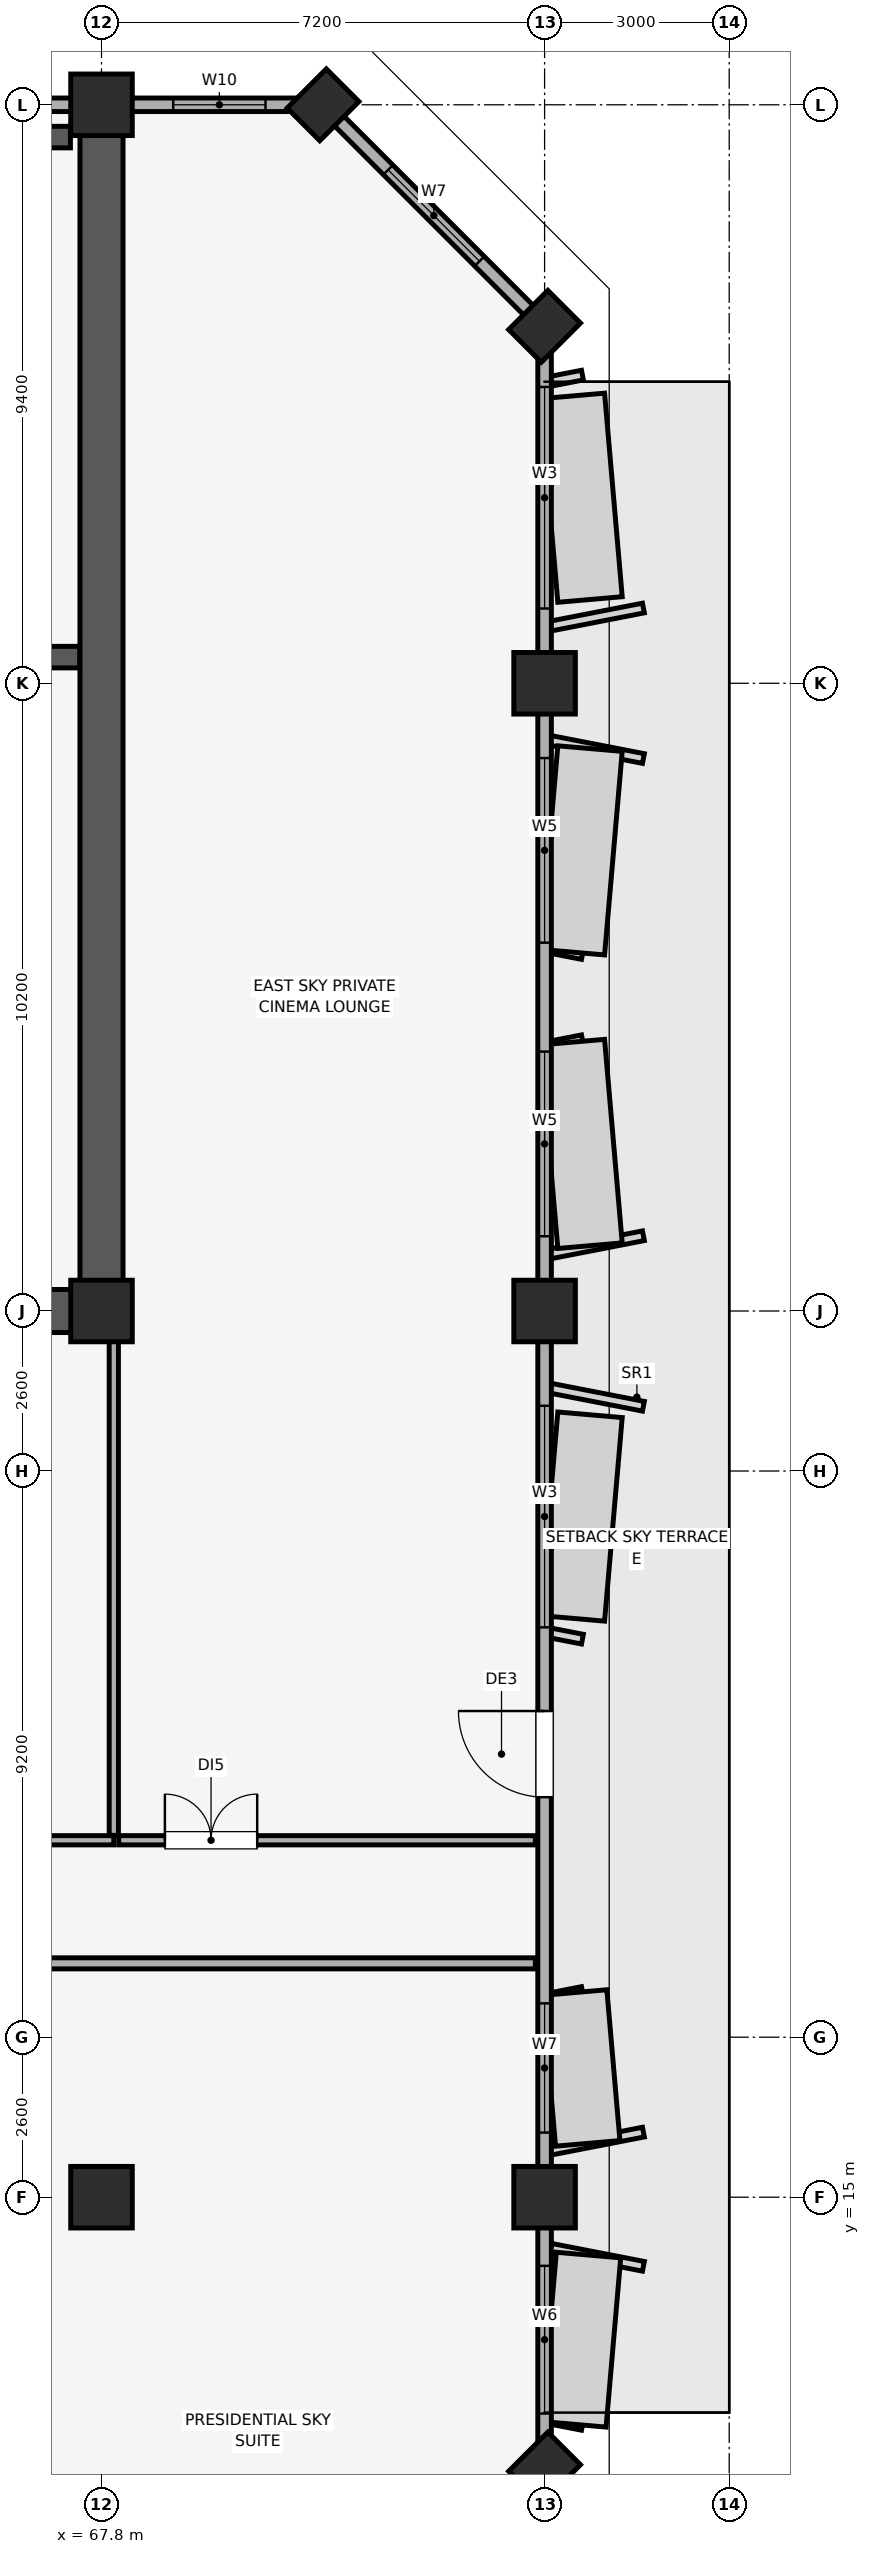
"""IFC4 building model, lengths in metres.
Left out: names, types, materials, properties, quantities, classifications, styles, units other than length and angle.
Written with IfcOpenShell. Run it as: python <this file> out.ifc"""

import sys

from ifc_helpers import new_model, si_unit, direction, frame, frame_2d, origin, origin_2d, place, context, subcontext, project, spatial, rectangle, extrude, element, fill, save


model = new_model("IFC4")
c1 = context("Model", 3, precision=1e-05, world=origin(), true_north=direction((0.0, 1.0)))
c2 = subcontext(c1, "Body", "Model", "MODEL_VIEW")
j1 = project(units=[si_unit("LENGTHUNIT", "METRE"), si_unit("PLANEANGLEUNIT", "RADIAN")], contexts=[c1])
p1 = place(None, origin())
s1 = spatial("IfcSite", under=j1, at=p1, CompositionType="ELEMENT")
p2 = place(p1, origin())
s2 = spatial("IfcBuilding", under=s1, at=p2, CompositionType="ELEMENT")
p3 = place(p2, frame((0.0, 0.0, 285.9)))
s3 = spatial("IfcBuildingStorey", under=s2, at=p3, CompositionType="ELEMENT", Elevation=285.9)
for number, where, z_axis, x_axis in (
    (1, (75.0, 15.0, 0.0), (0.0, 0.0, 1.0), (1.0, 0.0, 0.0)),
    (2, (75.0, 29.4, 0.0), (0.0, 0.0, 1.0), (1.0, 0.0, 0.0)),
    (3, (75.0, 39.6, 0.0), (0.0, 0.0, 1.0), (1.0, 0.0, 0.0)),
):
    element("IfcColumn", number, at=place(p3, frame(where, z_axis=z_axis, x_axis=x_axis)), inside=s3, PredefinedType="COLUMN", context=c2, shape_type="SweptSolid", body=[
        extrude(rectangle(XDim=1.0, YDim=1.0, at=origin_2d()), origin(), (0.0, 0.0, 1.0), 4.1),
    ])
for number, where, z_axis, x_axis in (
    (4, (75.0, 10.6, 0.0), (0.0, 0.0, 1.0), (0.707, 0.707, 0.0)),
    (5, (75.0, 45.4, 0.0), (0.0, 0.0, 1.0), (0.707, 0.707, 0.0)),
    (6, (71.4, 49.0, 0.0), (0.0, 0.0, 1.0), (0.707, 0.707, 0.0)),
):
    element("IfcColumn", number, at=place(p3, frame(where, z_axis=z_axis, x_axis=x_axis)), inside=s3, PredefinedType="PILASTER", context=c2, shape_type="SweptSolid", body=[
        extrude(rectangle(XDim=0.9, YDim=0.75, at=origin_2d()), origin(), (0.0, 0.0, 1.0), 4.1),
    ])
for number, where, z_axis, x_axis in (
    (7, (67.8, 15.0, 0.0), (0.0, 0.0, 1.0), (1.0, 0.0, 0.0)),
    (8, (67.8, 29.4, 0.0), (0.0, 0.0, 1.0), (1.0, 0.0, 0.0)),
    (9, (67.8, 49.0, 0.0), (0.0, 0.0, 1.0), (1.0, 0.0, 0.0)),
):
    element("IfcColumn", number, at=place(p3, frame(where, z_axis=z_axis, x_axis=x_axis)), inside=s3, PredefinedType="COLUMN", context=c2, shape_type="SweptSolid", body=[
        extrude(rectangle(XDim=1.0, YDim=1.0, at=origin_2d()), origin(), (0.0, 0.0, 1.0), 4.1),
    ])
p4 = place(p3, frame((71.4, 7.0, 0.0), z_axis=(0.0, 0.0, 1.0), x_axis=(0.707106781187, 0.707106781187, 0.0)))
e10 = element("IfcWall", 10, at=p4, inside=s3, PredefinedType="SOLIDWALL", context=c2, shape_type="SweptSolid", body=[
    extrude(rectangle(XDim=5.091, YDim=0.22, at=frame_2d((2.546, 0.0))), origin(), (0.0, 0.0, 1.0), 3.3),
])
p5 = place(p4, frame((1.496, 0.0, 0.85)))
e11 = element("IfcOpeningElement", 11, at=p5, cuts=e10, PredefinedType="OPENING", context=c2, shape_type="SweptSolid", body=[
    extrude(rectangle(XDim=2.1, YDim=1.6, at=frame_2d((1.05, 0.8))), frame((0.0, 0.12, 0.0), z_axis=(0.0, -1.0, 0.0), x_axis=(1.0, 0.0, 0.0)), (0.0, 0.0, 1.0), 0.24),
])
p6 = place(p3, frame((75.0, 10.6, 0.0), z_axis=(0.0, 0.0, 1.0), x_axis=(0.0, 1.0, 0.0)))
e12 = element("IfcWall", 12, at=p6, inside=s3, PredefinedType="SOLIDWALL", context=c2, shape_type="SweptSolid", body=[
    extrude(rectangle(XDim=34.8, YDim=0.22, at=frame_2d((17.4, 0.0))), origin(), (0.0, 0.0, 1.0), 3.3),
])
p7 = place(p6, frame((10.9, 0.0, 0.0)))
e13 = element("IfcOpeningElement", 13, at=p7, cuts=e12, PredefinedType="OPENING", context=c2, shape_type="SweptSolid", body=[
    extrude(rectangle(XDim=1.4, YDim=2.2, at=frame_2d((0.7, 1.1))), frame((0.0, 0.12, 0.0), z_axis=(0.0, -1.0, 0.0), x_axis=(1.0, 0.0, 0.0)), (0.0, 0.0, 1.0), 0.24),
])
p8 = place(p6, frame((0.885, 0.0, 0.85)))
e14 = element("IfcOpeningElement", 14, at=p8, cuts=e12, PredefinedType="OPENING", context=c2, shape_type="SweptSolid", body=[
    extrude(rectangle(XDim=2.4, YDim=1.5, at=frame_2d((1.2, 0.75))), frame((0.0, 0.12, 0.0), z_axis=(0.0, -1.0, 0.0), x_axis=(1.0, 0.0, 0.0)), (0.0, 0.0, 1.0), 0.24),
])
p9 = place(p6, frame((5.45, 0.0, 0.85)))
e15 = element("IfcOpeningElement", 15, at=p9, cuts=e12, PredefinedType="OPENING", context=c2, shape_type="SweptSolid", body=[
    extrude(rectangle(XDim=2.1, YDim=1.6, at=frame_2d((1.05, 0.8))), frame((0.0, 0.12, 0.0), z_axis=(0.0, -1.0, 0.0), x_axis=(1.0, 0.0, 0.0)), (0.0, 0.0, 1.0), 0.24),
])
p10 = place(p6, frame((13.66, 0.0, 0.85)))
e16 = element("IfcOpeningElement", 16, at=p10, cuts=e12, PredefinedType="OPENING", context=c2, shape_type="SweptSolid", body=[
    extrude(rectangle(XDim=3.6, YDim=1.65, at=frame_2d((1.8, 0.825))), frame((0.0, 0.12, 0.0), z_axis=(0.0, -1.0, 0.0), x_axis=(1.0, 0.0, 0.0)), (0.0, 0.0, 1.0), 0.24),
])
p11 = place(p6, frame((20.015, 0.0, 0.85)))
e17 = element("IfcOpeningElement", 17, at=p11, cuts=e12, PredefinedType="OPENING", context=c2, shape_type="SweptSolid", body=[
    extrude(rectangle(XDim=3.0, YDim=1.5, at=frame_2d((1.5, 0.75))), frame((0.0, 0.12, 0.0), z_axis=(0.0, -1.0, 0.0), x_axis=(1.0, 0.0, 0.0)), (0.0, 0.0, 1.0), 0.24),
])
p12 = place(p6, frame((24.785, 0.0, 0.85)))
e18 = element("IfcOpeningElement", 18, at=p12, cuts=e12, PredefinedType="OPENING", context=c2, shape_type="SweptSolid", body=[
    extrude(rectangle(XDim=3.0, YDim=1.5, at=frame_2d((1.5, 0.75))), frame((0.0, 0.12, 0.0), z_axis=(0.0, -1.0, 0.0), x_axis=(1.0, 0.0, 0.0)), (0.0, 0.0, 1.0), 0.24),
])
p13 = place(p6, frame((30.215, 0.0, 0.85)))
e19 = element("IfcOpeningElement", 19, at=p13, cuts=e12, PredefinedType="OPENING", context=c2, shape_type="SweptSolid", body=[
    extrude(rectangle(XDim=3.6, YDim=1.65, at=frame_2d((1.8, 0.825))), frame((0.0, 0.12, 0.0), z_axis=(0.0, -1.0, 0.0), x_axis=(1.0, 0.0, 0.0)), (0.0, 0.0, 1.0), 0.24),
])
p14 = place(p3, frame((75.0, 45.4, 0.0), z_axis=(0.0, 0.0, 1.0), x_axis=(-0.707106781187, 0.707106781187, 0.0)))
e20 = element("IfcWall", 20, at=p14, inside=s3, PredefinedType="SOLIDWALL", context=c2, shape_type="SweptSolid", body=[
    extrude(rectangle(XDim=5.091, YDim=0.22, at=frame_2d((2.546, 0.0))), origin(), (0.0, 0.0, 1.0), 3.3),
])
p15 = place(p14, frame((1.496, 0.0, 0.85)))
e21 = element("IfcOpeningElement", 21, at=p15, cuts=e20, PredefinedType="OPENING", context=c2, shape_type="SweptSolid", body=[
    extrude(rectangle(XDim=2.1, YDim=1.6, at=frame_2d((1.05, 0.8))), frame((0.0, 0.12, 0.0), z_axis=(0.0, -1.0, 0.0), x_axis=(1.0, 0.0, 0.0)), (0.0, 0.0, 1.0), 0.24),
])
p16 = place(p3, frame((71.4, 49.0, 0.0), z_axis=(0.0, 0.0, 1.0), x_axis=(-1.0, 0.0, 0.0)))
e22 = element("IfcWall", 22, at=p16, inside=s3, PredefinedType="SOLIDWALL", context=c2, shape_type="SweptSolid", body=[
    extrude(rectangle(XDim=58.8, YDim=0.22, at=frame_2d((29.4, 0.0))), origin(), (0.0, 0.0, 1.0), 3.3),
])
p17 = place(p16, frame((56.365, 0.0, 0.85)))
e23 = element("IfcOpeningElement", 23, at=p17, cuts=e22, PredefinedType="OPENING", context=c2, shape_type="SweptSolid", body=[
    extrude(rectangle(XDim=1.5, YDim=1.4, at=frame_2d((0.75, 0.7))), frame((0.0, 0.12, 0.0), z_axis=(0.0, -1.0, 0.0), x_axis=(1.0, 0.0, 0.0)), (0.0, 0.0, 1.0), 0.24),
])
p18 = place(p16, frame((0.935, 0.0, 0.85)))
e24 = element("IfcOpeningElement", 24, at=p18, cuts=e22, PredefinedType="OPENING", context=c2, shape_type="SweptSolid", body=[
    extrude(rectangle(XDim=1.5, YDim=1.4, at=frame_2d((0.75, 0.7))), frame((0.0, 0.12, 0.0), z_axis=(0.0, -1.0, 0.0), x_axis=(1.0, 0.0, 0.0)), (0.0, 0.0, 1.0), 0.24),
])
p19 = place(p16, frame((41.915, 0.0, 0.9)))
e25 = element("IfcOpeningElement", 25, at=p19, cuts=e22, PredefinedType="OPENING", context=c2, shape_type="SweptSolid", body=[
    extrude(rectangle(XDim=3.6, YDim=1.5, at=frame_2d((1.8, 0.75))), frame((0.0, 0.12, 0.0), z_axis=(0.0, -1.0, 0.0), x_axis=(1.0, 0.0, 0.0)), (0.0, 0.0, 1.0), 0.24),
])
p20 = place(p16, frame((36.85, 0.0, 0.9)))
e26 = element("IfcOpeningElement", 26, at=p20, cuts=e22, PredefinedType="OPENING", context=c2, shape_type="SweptSolid", body=[
    extrude(rectangle(XDim=3.0, YDim=1.5, at=frame_2d((1.5, 0.75))), frame((0.0, 0.12, 0.0), z_axis=(0.0, -1.0, 0.0), x_axis=(1.0, 0.0, 0.0)), (0.0, 0.0, 1.0), 0.24),
])
p21 = place(p16, frame((19.7, 0.0, 0.9)))
e27 = element("IfcOpeningElement", 27, at=p21, cuts=e22, PredefinedType="OPENING", context=c2, shape_type="SweptSolid", body=[
    extrude(rectangle(XDim=3.6, YDim=1.5, at=frame_2d((1.8, 0.75))), frame((0.0, 0.12, 0.0), z_axis=(0.0, -1.0, 0.0), x_axis=(1.0, 0.0, 0.0)), (0.0, 0.0, 1.0), 0.24),
])
p22 = place(p16, frame((14.635, 0.0, 0.9)))
e28 = element("IfcOpeningElement", 28, at=p22, cuts=e22, PredefinedType="OPENING", context=c2, shape_type="SweptSolid", body=[
    extrude(rectangle(XDim=2.4, YDim=1.5, at=frame_2d((1.2, 0.75))), frame((0.0, 0.12, 0.0), z_axis=(0.0, -1.0, 0.0), x_axis=(1.0, 0.0, 0.0)), (0.0, 0.0, 1.0), 0.24),
])
p23 = place(p3, frame((67.8, 29.4, 0.0), z_axis=(0.0, 0.0, 1.0), x_axis=(0.0, 1.0, 0.0)))
e29 = element("IfcWall", 29, at=p23, inside=s3, PredefinedType="SHEAR", context=c2, shape_type="SweptSolid", body=[
    extrude(rectangle(XDim=19.2, YDim=0.7, at=frame_2d((9.6, 0.0))), origin(), (0.0, 0.0, 1.0), 4.1),
])
p24 = place(p3, frame((60.4, 29.4, 0.0), z_axis=(0.0, 0.0, 1.0), x_axis=(1.0, 0.0, 0.0)))
e30 = element("IfcWall", 30, at=p24, inside=s3, PredefinedType="SHEAR", context=c2, shape_type="SweptSolid", body=[
    extrude(rectangle(XDim=7.045, YDim=0.7, at=frame_2d((3.522, 0.0))), origin(), (0.0, 0.0, 1.0), 4.1),
])
p25 = place(p3, frame((63.145, 40.025, 0.0), z_axis=(0.0, 0.0, 1.0), x_axis=(1.0, 0.0, 0.0)))
e31 = element("IfcWall", 31, at=p25, inside=s3, PredefinedType="SHEAR", context=c2, shape_type="SweptSolid", body=[
    extrude(rectangle(XDim=4.3, YDim=0.35, at=frame_2d((2.15, 0.0))), origin(), (0.0, 0.0, 1.0), 4.1),
])
p26 = place(p25, frame((1.24, 0.0, 0.0)))
e32 = element("IfcOpeningElement", 32, at=p26, cuts=e31, PredefinedType="OPENING", context=c2, shape_type="SweptSolid", body=[
    extrude(rectangle(XDim=1.15, YDim=2.15, at=frame_2d((0.575, 1.075))), frame((0.0, 0.185, 0.0), z_axis=(0.0, -1.0, 0.0), x_axis=(1.0, 0.0, 0.0)), (0.0, 0.0, 1.0), 0.37),
])
p27 = place(p3, frame((63.145, 48.475, 0.0), z_axis=(0.0, 0.0, 1.0), x_axis=(1.0, 0.0, 0.0)))
e33 = element("IfcWall", 33, at=p27, inside=s3, PredefinedType="SHEAR", context=c2, shape_type="SweptSolid", body=[
    extrude(rectangle(XDim=4.15, YDim=0.35, at=frame_2d((2.075, 0.0))), origin(), (0.0, 0.0, 1.0), 4.1),
])
p28 = place(p3, frame((61.528, 18.8, 0.0), z_axis=(0.0, 0.0, 1.0), x_axis=(1.0, 0.0, 0.0)))
e34 = element("IfcWall", 34, at=p28, inside=s3, PredefinedType="PARTITIONING", context=c2, shape_type="SweptSolid", body=[
    extrude(rectangle(XDim=13.322, YDim=0.18, at=frame_2d((6.661, 0.0))), origin(), (0.0, 0.0, 1.0), 4.1),
])
p29 = place(p28, frame((3.898, 0.0, 0.0)))
e35 = element("IfcOpeningElement", 35, at=p29, cuts=e34, PredefinedType="OPENING", context=c2, shape_type="SweptSolid", body=[
    extrude(rectangle(XDim=1.0, YDim=2.15, at=frame_2d((0.5, 1.075))), frame((0.0, 0.1, 0.0), z_axis=(0.0, -1.0, 0.0), x_axis=(1.0, 0.0, 0.0)), (0.0, 0.0, 1.0), 0.2),
])
p30 = place(p3, frame((59.0, 20.8, 0.0), z_axis=(0.0, 0.0, 1.0), x_axis=(1.0, 0.0, 0.0)))
e36 = element("IfcWall", 36, at=p30, inside=s3, PredefinedType="PARTITIONING", context=c2, shape_type="SweptSolid", body=[
    extrude(rectangle(XDim=9.0, YDim=0.15, at=frame_2d((4.5, 0.0))), origin(), (0.0, 0.0, 1.0), 4.1),
])
p31 = place(p30, frame((4.0, 0.0, 0.0)))
e37 = element("IfcOpeningElement", 37, at=p31, cuts=e36, PredefinedType="OPENING", context=c2, shape_type="SweptSolid", body=[
    extrude(rectangle(XDim=1.0, YDim=2.15, at=frame_2d((0.5, 1.075))), frame((0.0, 0.085, 0.0), z_axis=(0.0, -1.0, 0.0), x_axis=(1.0, 0.0, 0.0)), (0.0, 0.0, 1.0), 0.17),
])
p32 = place(p3, frame((68.0, 20.88, 0.0), z_axis=(0.0, 0.0, 1.0), x_axis=(0.0, 1.0, 0.0)))
e38 = element("IfcWall", 38, at=p32, inside=s3, PredefinedType="PARTITIONING", context=c2, shape_type="SweptSolid", body=[
    extrude(rectangle(XDim=8.51, YDim=0.15, at=frame_2d((4.255, 0.0))), origin(), (0.0, 0.0, 1.0), 3.74),
])
p33 = place(p3, frame((68.08, 20.8, 0.0), z_axis=(0.0, 0.0, 1.0), x_axis=(1.0, 0.0, 0.0)))
e39 = element("IfcWall", 39, at=p33, inside=s3, PredefinedType="PARTITIONING", context=c2, shape_type="SweptSolid", body=[
    extrude(rectangle(XDim=6.77, YDim=0.15, at=frame_2d((3.385, 0.0))), origin(), (0.0, 0.0, 1.0), 4.1),
])
p34 = place(p33, frame((0.75, 0.0, 0.0)))
e40 = element("IfcOpeningElement", 40, at=p34, cuts=e39, PredefinedType="OPENING", context=c2, shape_type="SweptSolid", body=[
    extrude(rectangle(XDim=1.5, YDim=2.25, at=frame_2d((0.75, 1.125))), frame((0.0, 0.085, 0.0), z_axis=(0.0, -1.0, 0.0), x_axis=(1.0, 0.0, 0.0)), (0.0, 0.0, 1.0), 0.17),
])
p35 = place(p15, origin())
e41 = element("IfcWindow", 41, at=p35, inside=s3, PartitioningType="SINGLE_PANEL", PredefinedType="WINDOW", context=c2, shape_type="SweptSolid", body=[
    extrude(rectangle(XDim=2.1, YDim=1.6, at=frame_2d((1.05, 0.8))), frame((0.0, 0.03, 0.0), z_axis=(0.0, -1.0, 0.0), x_axis=(1.0, 0.0, 0.0)), (0.0, 0.0, 1.0), 0.06),
])
fill(e21, e41)
p36 = place(p7, origin())
e42 = element("IfcDoor", 42, at=p36, inside=s3, OperationType="SINGLE_SWING_RIGHT", PredefinedType="DOOR", context=c2, shape_type="SweptSolid", body=[
    extrude(rectangle(XDim=1.4, YDim=2.2, at=frame_2d((0.7, 1.1))), frame((0.0, 0.025, 0.0), z_axis=(0.0, -1.0, 0.0), x_axis=(1.0, 0.0, 0.0)), (0.0, 0.0, 1.0), 0.05),
])
fill(e13, e42)
p37 = place(p8, origin())
e43 = element("IfcWindow", 43, at=p37, inside=s3, PartitioningType="SINGLE_PANEL", PredefinedType="WINDOW", context=c2, shape_type="SweptSolid", body=[
    extrude(rectangle(XDim=2.4, YDim=1.5, at=frame_2d((1.2, 0.75))), frame((0.0, 0.03, 0.0), z_axis=(0.0, -1.0, 0.0), x_axis=(1.0, 0.0, 0.0)), (0.0, 0.0, 1.0), 0.06),
])
fill(e14, e43)
p38 = place(p9, origin())
e44 = element("IfcWindow", 44, at=p38, inside=s3, PartitioningType="SINGLE_PANEL", PredefinedType="WINDOW", context=c2, shape_type="SweptSolid", body=[
    extrude(rectangle(XDim=2.1, YDim=1.6, at=frame_2d((1.05, 0.8))), frame((0.0, 0.03, 0.0), z_axis=(0.0, -1.0, 0.0), x_axis=(1.0, 0.0, 0.0)), (0.0, 0.0, 1.0), 0.06),
])
fill(e15, e44)
p39 = place(p10, origin())
e45 = element("IfcWindow", 45, at=p39, inside=s3, PartitioningType="SINGLE_PANEL", PredefinedType="WINDOW", context=c2, shape_type="SweptSolid", body=[
    extrude(rectangle(XDim=3.6, YDim=1.65, at=frame_2d((1.8, 0.825))), frame((0.0, 0.03, 0.0), z_axis=(0.0, -1.0, 0.0), x_axis=(1.0, 0.0, 0.0)), (0.0, 0.0, 1.0), 0.06),
])
fill(e16, e45)
p40 = place(p11, origin())
e46 = element("IfcWindow", 46, at=p40, inside=s3, PartitioningType="SINGLE_PANEL", PredefinedType="WINDOW", context=c2, shape_type="SweptSolid", body=[
    extrude(rectangle(XDim=3.0, YDim=1.5, at=frame_2d((1.5, 0.75))), frame((0.0, 0.03, 0.0), z_axis=(0.0, -1.0, 0.0), x_axis=(1.0, 0.0, 0.0)), (0.0, 0.0, 1.0), 0.06),
])
fill(e17, e46)
p41 = place(p12, origin())
e47 = element("IfcWindow", 47, at=p41, inside=s3, PartitioningType="SINGLE_PANEL", PredefinedType="WINDOW", context=c2, shape_type="SweptSolid", body=[
    extrude(rectangle(XDim=3.0, YDim=1.5, at=frame_2d((1.5, 0.75))), frame((0.0, 0.03, 0.0), z_axis=(0.0, -1.0, 0.0), x_axis=(1.0, 0.0, 0.0)), (0.0, 0.0, 1.0), 0.06),
])
fill(e18, e47)
p42 = place(p13, origin())
e48 = element("IfcWindow", 48, at=p42, inside=s3, PartitioningType="SINGLE_PANEL", PredefinedType="WINDOW", context=c2, shape_type="SweptSolid", body=[
    extrude(rectangle(XDim=3.6, YDim=1.65, at=frame_2d((1.8, 0.825))), frame((0.0, 0.03, 0.0), z_axis=(0.0, -1.0, 0.0), x_axis=(1.0, 0.0, 0.0)), (0.0, 0.0, 1.0), 0.06),
])
fill(e19, e48)
p43 = place(p18, origin())
e49 = element("IfcWindow", 49, at=p43, inside=s3, PartitioningType="SINGLE_PANEL", PredefinedType="WINDOW", context=c2, shape_type="SweptSolid", body=[
    extrude(rectangle(XDim=1.5, YDim=1.4, at=frame_2d((0.75, 0.7))), frame((0.0, 0.03, 0.0), z_axis=(0.0, -1.0, 0.0), x_axis=(1.0, 0.0, 0.0)), (0.0, 0.0, 1.0), 0.06),
])
fill(e24, e49)
p44 = place(p34, origin())
e50 = element("IfcDoor", 50, at=p44, inside=s3, OperationType="DOUBLE_DOOR_SINGLE_SWING", PredefinedType="DOOR", context=c2, shape_type="SweptSolid", body=[
    extrude(rectangle(XDim=1.5, YDim=2.25, at=frame_2d((0.75, 1.125))), frame((0.0, 0.025, 0.0), z_axis=(0.0, -1.0, 0.0), x_axis=(1.0, 0.0, 0.0)), (0.0, 0.0, 1.0), 0.05),
])
fill(e40, e50)
save(model, sys.argv[1])
